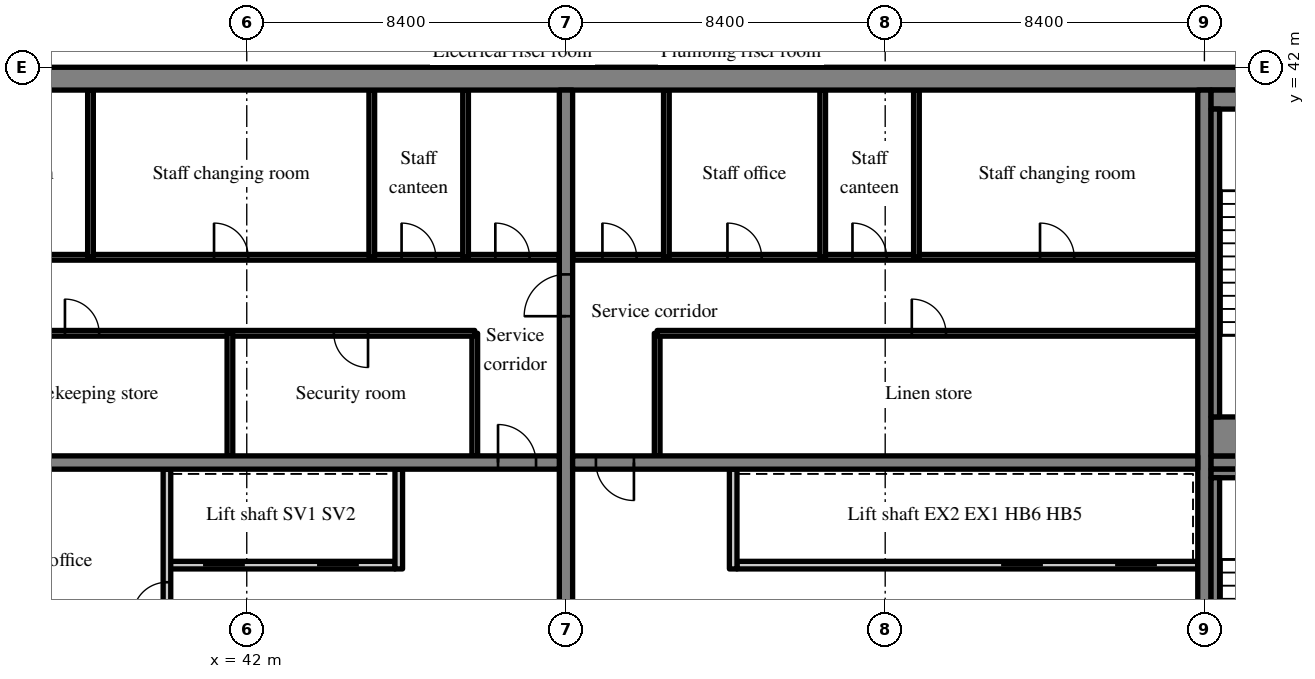
"""IFC4 building model, lengths in metres.
Left out: names, types, materials, properties, quantities, classifications, styles, units other than length and angle.
Written with IfcOpenShell. Run it as: python <this file> out.ifc"""

import sys

from ifc_helpers import new_model, si_unit, direction, frame, frame_2d, origin, place, context, subcontext, project, spatial, rectangle, extrude, source, transform, mapped, element, fill, save


model = new_model("IFC4")
c1 = context("Model", 3, precision=1e-05, world=origin(), true_north=direction((0.0, 1.0)))
c2 = subcontext(c1, "Body", "Model", "MODEL_VIEW")
j1 = project(units=[si_unit("LENGTHUNIT", "METRE"), si_unit("PLANEANGLEUNIT", "RADIAN")], contexts=[c1])
p1 = place(None, origin())
s1 = spatial("IfcSite", under=j1, at=p1, CompositionType="ELEMENT")
p2 = place(p1, origin())
s2 = spatial("IfcBuilding", under=s1, at=p2, CompositionType="ELEMENT")
p3 = place(p2, frame((0.0, 0.0, 229.6)))
s3 = spatial("IfcBuildingStorey", under=s2, at=p3, CompositionType="ELEMENT", Elevation=229.6)
m1 = source(origin(), c2, "Body", "SweptSolid", [
    extrude(rectangle(XDim=50.4, YDim=0.6, at=frame_2d((25.2, 0.0))), origin(), (0.0, 0.0, 1.0), 3.62),
])
p4 = place(p3, frame((25.2, 41.7, 0.0), z_axis=(0.0, 0.0, 1.0), x_axis=(1.0, 0.0, 0.0)))
e1 = element("IfcWall", 1, at=p4, inside=s3, PredefinedType="SHEAR", context=c2, shape_type="MappedRepresentation", body=[
    mapped(m1, transform((0.0, 0.0, 0.0), scale=1.0)),
])
m2 = source(origin(), c2, "Body", "SweptSolid", [
    extrude(rectangle(XDim=18.8, YDim=0.35, at=frame_2d((9.4, 0.0))), origin(), (0.0, 0.0, 1.0), 3.62),
])
p5 = place(p3, frame((50.4, 22.6, 0.0), z_axis=(0.0, 0.0, 1.0), x_axis=(0.0, 1.0, 0.0)))
e2 = element("IfcWall", 2, at=p5, inside=s3, PredefinedType="SHEAR", context=c2, shape_type="MappedRepresentation", body=[
    mapped(m2, transform((0.0, 0.0, 0.0), scale=1.0)),
])
m3 = source(origin(), c2, "Body", "SweptSolid", [
    extrude(rectangle(XDim=1.1, YDim=2.1, at=frame_2d((0.55, 1.05))), frame((0.0, 0.185, 0.0), z_axis=(0.0, -1.0, 0.0), x_axis=(1.0, 0.0, 0.0)), (0.0, 0.0, 1.0), 0.37),
])
p6 = place(p5, frame((12.85, 0.0, 0.0)))
e3 = element("IfcOpeningElement", 3, at=p6, cuts=e2, PredefinedType="OPENING", context=c2, shape_type="MappedRepresentation", body=[
    mapped(m3, transform((0.0, 0.0, 0.0), scale=1.0)),
])
p7 = place(p3, frame((67.2, 22.6, 0.0), z_axis=(0.0, 0.0, 1.0), x_axis=(0.0, 1.0, 0.0)))
e4 = element("IfcWall", 4, at=p7, inside=s3, PredefinedType="SHEAR", context=c2, shape_type="MappedRepresentation", body=[
    mapped(m2, transform((0.0, 0.0, 0.0), scale=1.0)),
])
m4 = source(origin(), c2, "Body", "SweptSolid", [
    extrude(rectangle(XDim=16.45, YDim=0.35, at=frame_2d((8.225, 0.0))), origin(), (0.0, 0.0, 1.0), 3.62),
])
p8 = place(p3, frame((33.775, 31.6, 0.0), z_axis=(0.0, 0.0, 1.0), x_axis=(1.0, 0.0, 0.0)))
e5 = element("IfcWall", 5, at=p8, inside=s3, PredefinedType="SHEAR", context=c2, shape_type="MappedRepresentation", body=[
    mapped(m4, transform((0.0, 0.0, 0.0), scale=1.0)),
])
m5 = source(origin(), c2, "Body", "SweptSolid", [
    extrude(rectangle(XDim=1.0, YDim=2.1, at=frame_2d((0.5, 1.05))), frame((0.0, 0.185, 0.0), z_axis=(0.0, -1.0, 0.0), x_axis=(1.0, 0.0, 0.0)), (0.0, 0.0, 1.0), 0.37),
])
p9 = place(p8, frame((14.837, 0.0, 0.0)))
e6 = element("IfcOpeningElement", 6, at=p9, cuts=e5, PredefinedType="OPENING", context=c2, shape_type="MappedRepresentation", body=[
    mapped(m5, transform((0.0, 0.0, 0.0), scale=1.0)),
])
m6 = source(origin(), c2, "Body", "SweptSolid", [
    extrude(rectangle(XDim=16.45, YDim=0.35, at=frame_2d((8.225, 0.0))), origin(), (0.0, 0.0, 1.0), 3.62),
])
p10 = place(p3, frame((50.575, 31.6, 0.0), z_axis=(0.0, 0.0, 1.0), x_axis=(1.0, 0.0, 0.0)))
e7 = element("IfcWall", 7, at=p10, inside=s3, PredefinedType="SHEAR", context=c2, shape_type="MappedRepresentation", body=[
    mapped(m6, transform((0.0, 0.0, 0.0), scale=1.0)),
])
p11 = place(p10, frame((0.613, 0.0, 0.0)))
e8 = element("IfcOpeningElement", 8, at=p11, cuts=e7, PredefinedType="OPENING", context=c2, shape_type="MappedRepresentation", body=[
    mapped(m5, transform((0.0, 0.0, 0.0), scale=1.0)),
])
m7 = source(origin(), c2, "Body", "SweptSolid", [
    extrude(rectangle(XDim=7.625, YDim=0.35, at=frame_2d((3.812, 0.0))), origin(), (0.0, 0.0, 1.0), 3.62),
])
p12 = place(p3, frame((67.375, 31.6, 0.0), z_axis=(0.0, 0.0, 1.0), x_axis=(1.0, 0.0, 0.0)))
e9 = element("IfcWall", 9, at=p12, inside=s3, PredefinedType="SHEAR", context=c2, shape_type="MappedRepresentation", body=[
    mapped(m7, transform((0.0, 0.0, 0.0), scale=1.0)),
])
p13 = place(p12, frame((5.8, 0.0, 0.0)))
e10 = element("IfcOpeningElement", 10, at=p13, cuts=e9, PredefinedType="OPENING", context=c2, shape_type="MappedRepresentation", body=[
    mapped(m3, transform((0.0, 0.0, 0.0), scale=1.0)),
])
m8 = source(origin(), c2, "Body", "SweptSolid", [
    extrude(rectangle(XDim=6.0, YDim=0.2, at=frame_2d((3.0, 0.0))), origin(), (0.0, 0.0, 1.0), 3.62),
])
p14 = place(p3, frame((39.9, 28.9, 0.0), z_axis=(0.0, 0.0, 1.0), x_axis=(1.0, 0.0, 0.0)))
e11 = element("IfcWall", 11, at=p14, inside=s3, PredefinedType="SOLIDWALL", context=c2, shape_type="MappedRepresentation", body=[
    mapped(m8, transform((0.0, 0.0, 0.0), scale=1.0)),
])
m9 = source(origin(), c2, "Body", "SweptSolid", [
    extrude(rectangle(XDim=1.1, YDim=2.1, at=frame_2d((0.55, 1.05))), frame((0.0, 0.11, 0.0), z_axis=(0.0, -1.0, 0.0), x_axis=(1.0, 0.0, 0.0)), (0.0, 0.0, 1.0), 0.22),
])
p15 = place(p14, frame((0.95, 0.0, 0.0)))
e12 = element("IfcOpeningElement", 12, at=p15, cuts=e11, PredefinedType="OPENING", context=c2, shape_type="MappedRepresentation", body=[
    mapped(m9, transform((0.0, 0.0, 0.0), scale=1.0)),
])
p16 = place(p14, frame((3.95, 0.0, 0.0)))
e13 = element("IfcOpeningElement", 13, at=p16, cuts=e11, PredefinedType="OPENING", context=c2, shape_type="MappedRepresentation", body=[
    mapped(m9, transform((0.0, 0.0, 0.0), scale=1.0)),
])
m10 = source(origin(), c2, "Body", "SweptSolid", [
    extrude(rectangle(XDim=8.825, YDim=0.2, at=frame_2d((4.413, 0.0))), origin(), (0.0, 0.0, 1.0), 3.62),
])
p17 = place(p3, frame((39.9, 22.6, 0.0), z_axis=(0.0, 0.0, 1.0), x_axis=(0.0, 1.0, 0.0)))
e14 = element("IfcWall", 14, at=p17, inside=s3, PredefinedType="PARTITIONING", context=c2, shape_type="MappedRepresentation", body=[
    mapped(m10, transform((0.0, 0.0, 0.0), scale=1.0)),
])
m11 = source(origin(), c2, "Body", "SweptSolid", [
    extrude(rectangle(XDim=0.9, YDim=2.1, at=frame_2d((0.45, 1.05))), frame((0.0, 0.11, 0.0), z_axis=(0.0, -1.0, 0.0), x_axis=(1.0, 0.0, 0.0)), (0.0, 0.0, 1.0), 0.22),
])
p18 = place(p17, frame((4.95, 0.0, 0.0)))
e15 = element("IfcOpeningElement", 15, at=p18, cuts=e14, PredefinedType="OPENING", context=c2, shape_type="MappedRepresentation", body=[
    mapped(m11, transform((0.0, 0.0, 0.0), scale=1.0)),
])
m12 = source(origin(), c2, "Body", "SweptSolid", [
    extrude(rectangle(XDim=2.625, YDim=0.2, at=frame_2d((1.312, 0.0))), origin(), (0.0, 0.0, 1.0), 3.62),
])
p19 = place(p3, frame((46.0, 28.8, 0.0), z_axis=(0.0, 0.0, 1.0), x_axis=(0.0, 1.0, 0.0)))
e16 = element("IfcWall", 16, at=p19, inside=s3, PredefinedType="SOLIDWALL", context=c2, shape_type="MappedRepresentation", body=[
    mapped(m12, transform((0.0, 0.0, 0.0), scale=1.0)),
])
m13 = source(origin(), c2, "Body", "SweptSolid", [
    extrude(rectangle(XDim=3.225, YDim=0.15, at=frame_2d((1.613, 0.0))), origin(), (0.0, 0.0, 1.0), 3.62),
])
p20 = place(p3, frame((48.0, 31.775, 0.0), z_axis=(0.0, 0.0, 1.0), x_axis=(0.0, 1.0, 0.0)))
e17 = element("IfcWall", 17, at=p20, inside=s3, PredefinedType="PARTITIONING", context=c2, shape_type="MappedRepresentation", body=[
    mapped(m13, transform((0.0, 0.0, 0.0), scale=1.0)),
])
m14 = source(origin(), c2, "Body", "SweptSolid", [
    extrude(rectangle(XDim=14.225, YDim=0.15, at=frame_2d((7.113, 0.0))), origin(), (0.0, 0.0, 1.0), 3.62),
])
p21 = place(p3, frame((33.775, 35.0, 0.0), z_axis=(0.0, 0.0, 1.0), x_axis=(1.0, 0.0, 0.0)))
e18 = element("IfcWall", 18, at=p21, inside=s3, PredefinedType="PARTITIONING", context=c2, shape_type="MappedRepresentation", body=[
    mapped(m14, transform((0.0, 0.0, 0.0), scale=1.0)),
])
m15 = source(origin(), c2, "Body", "SweptSolid", [
    extrude(rectangle(XDim=0.9, YDim=2.1, at=frame_2d((0.45, 1.05))), frame((0.0, 0.085, 0.0), z_axis=(0.0, -1.0, 0.0), x_axis=(1.0, 0.0, 0.0)), (0.0, 0.0, 1.0), 0.17),
])
p22 = place(p21, frame((3.441, 0.0, 0.0)))
e19 = element("IfcOpeningElement", 19, at=p22, cuts=e18, PredefinedType="OPENING", context=c2, shape_type="MappedRepresentation", body=[
    mapped(m15, transform((0.0, 0.0, 0.0), scale=1.0)),
])
p23 = place(p21, frame((10.516, 0.0, 0.0)))
e20 = element("IfcOpeningElement", 20, at=p23, cuts=e18, PredefinedType="OPENING", context=c2, shape_type="MappedRepresentation", body=[
    mapped(m15, transform((0.0, 0.0, 0.0), scale=1.0)),
])
m16 = source(origin(), c2, "Body", "SweptSolid", [
    extrude(rectangle(XDim=16.45, YDim=0.15, at=frame_2d((8.225, 0.0))), origin(), (0.0, 0.0, 1.0), 3.62),
])
p24 = place(p3, frame((33.775, 37.0, 0.0), z_axis=(0.0, 0.0, 1.0), x_axis=(1.0, 0.0, 0.0)))
e21 = element("IfcWall", 21, at=p24, inside=s3, PredefinedType="PARTITIONING", context=c2, shape_type="MappedRepresentation", body=[
    mapped(m16, transform((0.0, 0.0, 0.0), scale=1.0)),
])
p25 = place(p24, frame((1.606, 0.0, 0.0)))
e22 = element("IfcOpeningElement", 22, at=p25, cuts=e21, PredefinedType="OPENING", context=c2, shape_type="MappedRepresentation", body=[
    mapped(m15, transform((0.0, 0.0, 0.0), scale=1.0)),
])
p26 = place(p24, frame((7.364, 0.0, 0.0)))
e23 = element("IfcOpeningElement", 23, at=p26, cuts=e21, PredefinedType="OPENING", context=c2, shape_type="MappedRepresentation", body=[
    mapped(m15, transform((0.0, 0.0, 0.0), scale=1.0)),
])
p27 = place(p24, frame((12.299, 0.0, 0.0)))
e24 = element("IfcOpeningElement", 24, at=p27, cuts=e21, PredefinedType="OPENING", context=c2, shape_type="MappedRepresentation", body=[
    mapped(m15, transform((0.0, 0.0, 0.0), scale=1.0)),
])
p28 = place(p24, frame((14.766, 0.0, 0.0)))
e25 = element("IfcOpeningElement", 25, at=p28, cuts=e21, PredefinedType="OPENING", context=c2, shape_type="MappedRepresentation", body=[
    mapped(m15, transform((0.0, 0.0, 0.0), scale=1.0)),
])
p29 = place(p3, frame((41.557, 31.775, 0.0), z_axis=(0.0, 0.0, 1.0), x_axis=(0.0, 1.0, 0.0)))
e26 = element("IfcWall", 26, at=p29, inside=s3, PredefinedType="PARTITIONING", context=c2, shape_type="MappedRepresentation", body=[
    mapped(m13, transform((0.0, 0.0, 0.0), scale=1.0)),
])
m17 = source(origin(), c2, "Body", "SweptSolid", [
    extrude(rectangle(XDim=4.4, YDim=0.15, at=frame_2d((2.2, 0.0))), origin(), (0.0, 0.0, 1.0), 3.62),
])
for number, where, z_axis, x_axis in (
    (27, (37.888, 37.0, 0.0), (0.0, 0.0, 1.0), (0.0, 1.0, 0.0)),
    (28, (45.29, 37.0, 0.0), (0.0, 0.0, 1.0), (0.0, 1.0, 0.0)),
    (29, (47.758, 37.0, 0.0), (0.0, 0.0, 1.0), (0.0, 1.0, 0.0)),
):
    element("IfcWall", number, at=place(p3, frame(where, z_axis=z_axis, x_axis=x_axis)), inside=s3, PredefinedType="PARTITIONING", context=c2, shape_type="MappedRepresentation", body=[
        mapped(m17, transform((0.0, 0.0, 0.0), scale=1.0)),
    ])
m18 = source(origin(), c2, "Body", "SweptSolid", [
    extrude(rectangle(XDim=12.125, YDim=0.2, at=frame_2d((6.062, 0.0))), origin(), (0.0, 0.0, 1.0), 3.62),
])
p30 = place(p3, frame((67.025, 28.9, 0.0), z_axis=(0.0, 0.0, 1.0), x_axis=(-1.0, 0.0, 0.0)))
e30 = element("IfcWall", 30, at=p30, inside=s3, PredefinedType="SOLIDWALL", context=c2, shape_type="MappedRepresentation", body=[
    mapped(m18, transform((0.0, 0.0, 0.0), scale=1.0)),
])
p31 = place(p30, frame((1.075, 0.0, 0.0)))
e31 = element("IfcOpeningElement", 31, at=p31, cuts=e30, PredefinedType="OPENING", context=c2, shape_type="MappedRepresentation", body=[
    mapped(m9, transform((0.0, 0.0, 0.0), scale=1.0)),
])
p32 = place(p30, frame((4.075, 0.0, 0.0)))
e32 = element("IfcOpeningElement", 32, at=p32, cuts=e30, PredefinedType="OPENING", context=c2, shape_type="MappedRepresentation", body=[
    mapped(m9, transform((0.0, 0.0, 0.0), scale=1.0)),
])
p33 = place(p3, frame((54.8, 28.8, 0.0), z_axis=(0.0, 0.0, 1.0), x_axis=(0.0, 1.0, 0.0)))
e33 = element("IfcWall", 33, at=p33, inside=s3, PredefinedType="SOLIDWALL", context=c2, shape_type="MappedRepresentation", body=[
    mapped(m12, transform((0.0, 0.0, 0.0), scale=1.0)),
])
p34 = place(p3, frame((52.8, 31.775, 0.0), z_axis=(0.0, 0.0, 1.0), x_axis=(0.0, 1.0, 0.0)))
e34 = element("IfcWall", 34, at=p34, inside=s3, PredefinedType="PARTITIONING", context=c2, shape_type="MappedRepresentation", body=[
    mapped(m13, transform((0.0, 0.0, 0.0), scale=1.0)),
])
m19 = source(origin(), c2, "Body", "SweptSolid", [
    extrude(rectangle(XDim=14.225, YDim=0.15, at=frame_2d((7.112, 0.0))), origin(), (0.0, 0.0, 1.0), 3.62),
])
p35 = place(p3, frame((67.025, 35.0, 0.0), z_axis=(0.0, 0.0, 1.0), x_axis=(-1.0, 0.0, 0.0)))
e35 = element("IfcWall", 35, at=p35, inside=s3, PredefinedType="PARTITIONING", context=c2, shape_type="MappedRepresentation", body=[
    mapped(m19, transform((0.0, 0.0, 0.0), scale=1.0)),
])
p36 = place(p35, frame((6.625, 0.0, 0.0)))
e36 = element("IfcOpeningElement", 36, at=p36, cuts=e35, PredefinedType="OPENING", context=c2, shape_type="MappedRepresentation", body=[
    mapped(m15, transform((0.0, 0.0, 0.0), scale=1.0)),
])
m20 = source(origin(), c2, "Body", "SweptSolid", [
    extrude(rectangle(XDim=16.45, YDim=0.15, at=frame_2d((8.225, 0.0))), origin(), (0.0, 0.0, 1.0), 3.62),
])
p37 = place(p3, frame((67.025, 37.0, 0.0), z_axis=(0.0, 0.0, 1.0), x_axis=(-1.0, 0.0, 0.0)))
e37 = element("IfcWall", 37, at=p37, inside=s3, PredefinedType="PARTITIONING", context=c2, shape_type="MappedRepresentation", body=[
    mapped(m20, transform((0.0, 0.0, 0.0), scale=1.0)),
])
p38 = place(p37, frame((3.251, 0.0, 0.0)))
e38 = element("IfcOpeningElement", 38, at=p38, cuts=e37, PredefinedType="OPENING", context=c2, shape_type="MappedRepresentation", body=[
    mapped(m15, transform((0.0, 0.0, 0.0), scale=1.0)),
])
p39 = place(p37, frame((8.186, 0.0, 0.0)))
e39 = element("IfcOpeningElement", 39, at=p39, cuts=e37, PredefinedType="OPENING", context=c2, shape_type="MappedRepresentation", body=[
    mapped(m15, transform((0.0, 0.0, 0.0), scale=1.0)),
])
p40 = place(p37, frame((11.476, 0.0, 0.0)))
e40 = element("IfcOpeningElement", 40, at=p40, cuts=e37, PredefinedType="OPENING", context=c2, shape_type="MappedRepresentation", body=[
    mapped(m15, transform((0.0, 0.0, 0.0), scale=1.0)),
])
p41 = place(p37, frame((14.766, 0.0, 0.0)))
e41 = element("IfcOpeningElement", 41, at=p41, cuts=e37, PredefinedType="OPENING", context=c2, shape_type="MappedRepresentation", body=[
    mapped(m15, transform((0.0, 0.0, 0.0), scale=1.0)),
])
for number, where, z_axis, x_axis in (
    (42, (59.622, 37.0, 0.0), (0.0, 0.0, 1.0), (0.0, 1.0, 0.0)),
    (43, (57.155, 37.0, 0.0), (0.0, 0.0, 1.0), (0.0, 1.0, 0.0)),
    (44, (53.042, 37.0, 0.0), (0.0, 0.0, 1.0), (0.0, 1.0, 0.0)),
):
    element("IfcWall", number, at=place(p3, frame(where, z_axis=z_axis, x_axis=x_axis)), inside=s3, PredefinedType="PARTITIONING", context=c2, shape_type="MappedRepresentation", body=[
        mapped(m17, transform((0.0, 0.0, 0.0), scale=1.0)),
    ])
m21 = source(origin(), c2, "Body", "SweptSolid", [
    extrude(rectangle(XDim=4.875, YDim=0.225, at=frame_2d((2.438, 0.0))), origin(), (0.0, 0.0, 1.0), 3.62),
])
p42 = place(p3, frame((67.375, 31.312, 0.0), z_axis=(0.0, 0.0, 1.0), x_axis=(1.0, 0.0, 0.0)))
e45 = element("IfcWall", 45, at=p42, inside=s3, PredefinedType="SOLIDWALL", context=c2, shape_type="MappedRepresentation", body=[
    mapped(m21, transform((0.0, 0.0, 0.0), scale=1.0)),
])
m22 = source(origin(), c2, "Body", "SweptSolid", [
    extrude(rectangle(XDim=8.1, YDim=0.225, at=frame_2d((4.05, 0.0))), origin(), (0.0, 0.0, 1.0), 3.62),
])
p43 = place(p3, frame((67.487, 23.1, 0.0), z_axis=(0.0, 0.0, 1.0), x_axis=(0.0, 1.0, 0.0)))
e46 = element("IfcWall", 46, at=p43, inside=s3, PredefinedType="SOLIDWALL", context=c2, shape_type="MappedRepresentation", body=[
    mapped(m22, transform((0.0, 0.0, 0.0), scale=1.0)),
])
m23 = source(origin(), c2, "Body", "SweptSolid", [
    extrude(rectangle(XDim=4.875, YDim=0.5, at=frame_2d((2.438, 0.0))), origin(), (0.0, 0.0, 1.0), 3.62),
])
p44 = place(p3, frame((67.375, 41.15, 0.0), z_axis=(0.0, 0.0, 1.0), x_axis=(1.0, 0.0, 0.0)))
e47 = element("IfcWall", 47, at=p44, inside=s3, PredefinedType="SOLIDWALL", context=c2, shape_type="MappedRepresentation", body=[
    mapped(m23, transform((0.0, 0.0, 0.0), scale=1.0)),
])
m24 = source(origin(), c2, "Body", "SweptSolid", [
    extrude(rectangle(XDim=4.875, YDim=1.025, at=frame_2d((2.438, 0.0))), origin(), (0.0, 0.0, 1.0), 3.62),
])
p45 = place(p3, frame((67.375, 32.287, 0.0), z_axis=(0.0, 0.0, 1.0), x_axis=(1.0, 0.0, 0.0)))
e48 = element("IfcWall", 48, at=p45, inside=s3, PredefinedType="SOLIDWALL", context=c2, shape_type="MappedRepresentation", body=[
    mapped(m24, transform((0.0, 0.0, 0.0), scale=1.0)),
])
p46 = place(p3, frame((67.487, 32.8, 0.0), z_axis=(0.0, 0.0, 1.0), x_axis=(0.0, 1.0, 0.0)))
e49 = element("IfcWall", 49, at=p46, inside=s3, PredefinedType="SOLIDWALL", context=c2, shape_type="MappedRepresentation", body=[
    mapped(m22, transform((0.0, 0.0, 0.0), scale=1.0)),
])
m25 = source(origin(), c2, "Body", "SweptSolid", [
    extrude(rectangle(XDim=1.0, YDim=2.1, at=frame_2d((0.5, 1.05))), frame((0.0, 0.025, 0.0), z_axis=(0.0, -1.0, 0.0), x_axis=(1.0, 0.0, 0.0)), (0.0, 0.0, 1.0), 0.05),
])
p47 = place(p9, origin())
e50 = element("IfcDoor", 50, at=p47, inside=s3, OperationType="SINGLE_SWING_LEFT", PredefinedType="DOOR", context=c2, shape_type="MappedRepresentation", body=[
    mapped(m25, transform((0.0, 0.0, 0.0), scale=1.0)),
])
fill(e6, e50)
m26 = source(origin(), c2, "Body", "SweptSolid", [
    extrude(rectangle(XDim=1.1, YDim=2.1, at=frame_2d((0.55, 1.05))), frame((0.0, 0.025, 0.0), z_axis=(0.0, -1.0, 0.0), x_axis=(1.0, 0.0, 0.0)), (0.0, 0.0, 1.0), 0.05),
])
p48 = place(p15, origin())
e51 = element("IfcDoor", 51, at=p48, inside=s3, OperationType="SLIDING_TO_LEFT", PredefinedType="DOOR", context=c2, shape_type="MappedRepresentation", body=[
    mapped(m26, transform((0.0, 0.0, 0.0), scale=1.0)),
])
fill(e12, e51)
p49 = place(p16, origin())
e52 = element("IfcDoor", 52, at=p49, inside=s3, OperationType="SLIDING_TO_RIGHT", PredefinedType="DOOR", context=c2, shape_type="MappedRepresentation", body=[
    mapped(m26, transform((0.0, 0.0, 0.0), scale=1.0)),
])
fill(e13, e52)
m27 = source(origin(), c2, "Body", "SweptSolid", [
    extrude(rectangle(XDim=0.9, YDim=2.1, at=frame_2d((0.45, 1.05))), frame((0.0, 0.025, 0.0), z_axis=(0.0, -1.0, 0.0), x_axis=(1.0, 0.0, 0.0)), (0.0, 0.0, 1.0), 0.05),
])
p50 = place(p18, origin())
e53 = element("IfcDoor", 53, at=p50, inside=s3, OperationType="SINGLE_SWING_LEFT", PredefinedType="DOOR", context=c2, shape_type="MappedRepresentation", body=[
    mapped(m27, transform((0.0, 0.0, 0.0), scale=1.0)),
])
fill(e15, e53)
p51 = place(p22, origin())
e54 = element("IfcDoor", 54, at=p51, inside=s3, OperationType="SINGLE_SWING_LEFT", PredefinedType="DOOR", context=c2, shape_type="MappedRepresentation", body=[
    mapped(m27, transform((0.0, 0.0, 0.0), scale=1.0)),
])
fill(e19, e54)
p52 = place(p23, origin())
e55 = element("IfcDoor", 55, at=p52, inside=s3, OperationType="SINGLE_SWING_RIGHT", PredefinedType="DOOR", context=c2, shape_type="MappedRepresentation", body=[
    mapped(m27, transform((0.0, 0.0, 0.0), scale=1.0)),
])
fill(e20, e55)
p53 = place(p26, origin())
e56 = element("IfcDoor", 56, at=p53, inside=s3, OperationType="SINGLE_SWING_LEFT", PredefinedType="DOOR", context=c2, shape_type="MappedRepresentation", body=[
    mapped(m27, transform((0.0, 0.0, 0.0), scale=1.0)),
])
fill(e23, e56)
p54 = place(p27, origin())
e57 = element("IfcDoor", 57, at=p54, inside=s3, OperationType="SINGLE_SWING_LEFT", PredefinedType="DOOR", context=c2, shape_type="MappedRepresentation", body=[
    mapped(m27, transform((0.0, 0.0, 0.0), scale=1.0)),
])
fill(e24, e57)
p55 = place(p28, origin())
e58 = element("IfcDoor", 58, at=p55, inside=s3, OperationType="SINGLE_SWING_LEFT", PredefinedType="DOOR", context=c2, shape_type="MappedRepresentation", body=[
    mapped(m27, transform((0.0, 0.0, 0.0), scale=1.0)),
])
fill(e25, e58)
p56 = place(p11, origin())
e59 = element("IfcDoor", 59, at=p56, inside=s3, OperationType="SINGLE_SWING_RIGHT", PredefinedType="DOOR", context=c2, shape_type="MappedRepresentation", body=[
    mapped(m25, transform((0.0, 0.0, 0.0), scale=1.0)),
])
fill(e8, e59)
p57 = place(p31, origin())
e60 = element("IfcDoor", 60, at=p57, inside=s3, OperationType="SLIDING_TO_RIGHT", PredefinedType="DOOR", context=c2, shape_type="MappedRepresentation", body=[
    mapped(m26, transform((0.0, 0.0, 0.0), scale=1.0)),
])
fill(e31, e60)
p58 = place(p32, origin())
e61 = element("IfcDoor", 61, at=p58, inside=s3, OperationType="SLIDING_TO_LEFT", PredefinedType="DOOR", context=c2, shape_type="MappedRepresentation", body=[
    mapped(m26, transform((0.0, 0.0, 0.0), scale=1.0)),
])
fill(e32, e61)
p59 = place(p36, origin())
e62 = element("IfcDoor", 62, at=p59, inside=s3, OperationType="SINGLE_SWING_RIGHT", PredefinedType="DOOR", context=c2, shape_type="MappedRepresentation", body=[
    mapped(m27, transform((0.0, 0.0, 0.0), scale=1.0)),
])
fill(e36, e62)
p60 = place(p38, origin())
e63 = element("IfcDoor", 63, at=p60, inside=s3, OperationType="SINGLE_SWING_RIGHT", PredefinedType="DOOR", context=c2, shape_type="MappedRepresentation", body=[
    mapped(m27, transform((0.0, 0.0, 0.0), scale=1.0)),
])
fill(e38, e63)
p61 = place(p39, origin())
e64 = element("IfcDoor", 64, at=p61, inside=s3, OperationType="SINGLE_SWING_RIGHT", PredefinedType="DOOR", context=c2, shape_type="MappedRepresentation", body=[
    mapped(m27, transform((0.0, 0.0, 0.0), scale=1.0)),
])
fill(e39, e64)
p62 = place(p40, origin())
e65 = element("IfcDoor", 65, at=p62, inside=s3, OperationType="SINGLE_SWING_RIGHT", PredefinedType="DOOR", context=c2, shape_type="MappedRepresentation", body=[
    mapped(m27, transform((0.0, 0.0, 0.0), scale=1.0)),
])
fill(e40, e65)
p63 = place(p41, origin())
e66 = element("IfcDoor", 66, at=p63, inside=s3, OperationType="SINGLE_SWING_RIGHT", PredefinedType="DOOR", context=c2, shape_type="MappedRepresentation", body=[
    mapped(m27, transform((0.0, 0.0, 0.0), scale=1.0)),
])
fill(e41, e66)
p64 = place(p6, origin())
e67 = element("IfcDoor", 67, at=p64, inside=s3, OperationType="SINGLE_SWING_LEFT", PredefinedType="DOOR", context=c2, shape_type="MappedRepresentation", body=[
    mapped(m26, transform((0.0, 0.0, 0.0), scale=1.0)),
])
fill(e3, e67)
save(model, sys.argv[1])
